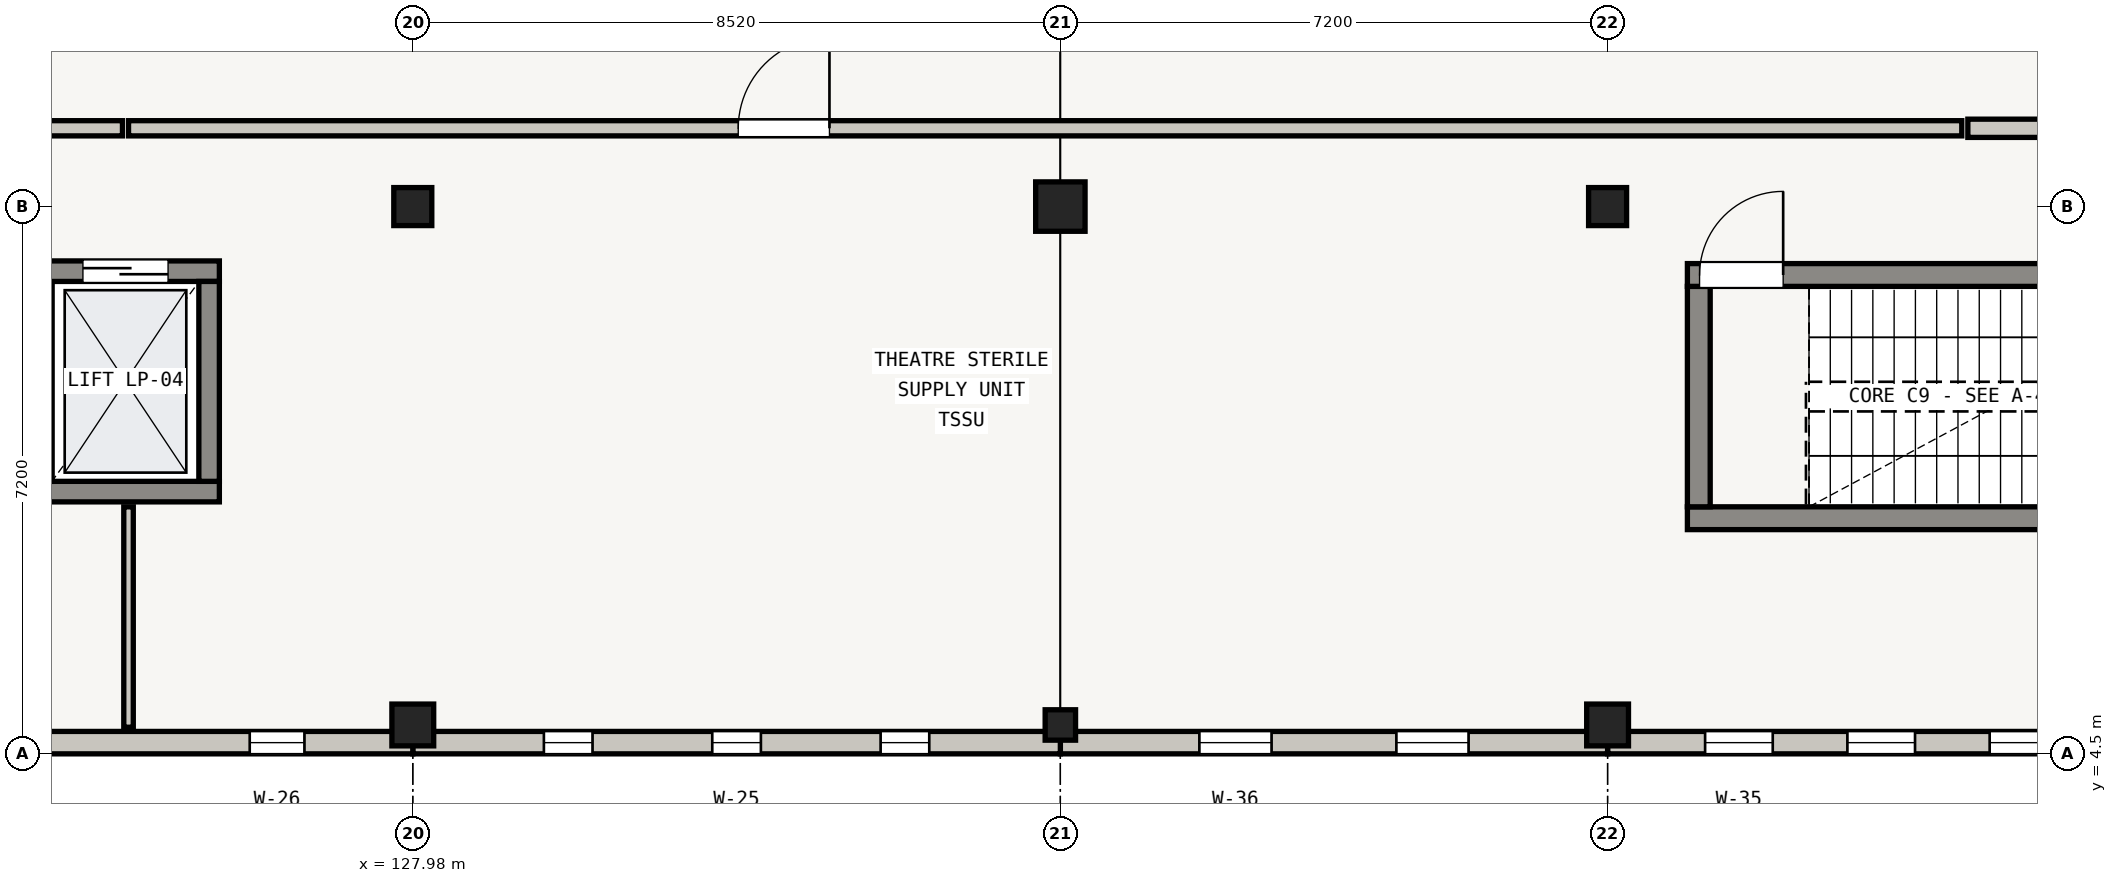
"""IFC4 building model, lengths in metres.
Left out: names, types, materials, properties, quantities, classifications, styles, units other than length and angle.
Written with IfcOpenShell. Run it as: python <this file> out.ifc"""

import sys

from ifc_helpers import new_model, si_unit, direction, frame, frame_2d, origin, origin_2d, place, context, subcontext, project, spatial, rectangle, extrude, element, fill, save


model = new_model("IFC4")
c1 = context("Model", 3, precision=1e-05, world=origin(), true_north=direction((0.0, 1.0)))
c2 = subcontext(c1, "Body", "Model", "MODEL_VIEW")
j1 = project(units=[si_unit("LENGTHUNIT", "METRE"), si_unit("PLANEANGLEUNIT", "RADIAN")], contexts=[c1])
p1 = place(None, origin())
s1 = spatial("IfcSite", under=j1, at=p1, CompositionType="ELEMENT")
p2 = place(p1, origin())
s2 = spatial("IfcBuilding", under=s1, at=p2, CompositionType="ELEMENT")
p3 = place(p2, frame((0.0, 0.0, 4.5)))
s3 = spatial("IfcBuildingStorey", under=s2, at=p3, CompositionType="ELEMENT", Elevation=4.5)
p4 = place(p3, frame((127.98, 4.88, 0.0), z_axis=(0.0, 0.0, 1.0), x_axis=(1.0, 0.0, 0.0)))
e1 = element("IfcColumn", 1, at=p4, inside=s3, PredefinedType="COLUMN", context=c2, shape_type="SweptSolid", body=[
    extrude(rectangle(XDim=0.55, YDim=0.55, at=origin_2d()), origin(), (0.0, 0.0, 1.0), 3.905),
])
p5 = place(p3, frame((127.98, 11.7, 0.0), z_axis=(0.0, 0.0, 1.0), x_axis=(1.0, 0.0, 0.0)))
e2 = element("IfcColumn", 2, at=p5, inside=s3, PredefinedType="COLUMN", context=c2, shape_type="SweptSolid", body=[
    extrude(rectangle(XDim=0.5, YDim=0.5, at=origin_2d()), origin(), (0.0, 0.0, 1.0), 3.905),
])
p6 = place(p3, frame((136.5, 4.88, 0.0), z_axis=(0.0, 0.0, 1.0), x_axis=(1.0, 0.0, 0.0)))
e3 = element("IfcColumn", 3, at=p6, inside=s3, PredefinedType="COLUMN", context=c2, shape_type="SweptSolid", body=[
    extrude(rectangle(XDim=0.4, YDim=0.4, at=origin_2d()), origin(), (0.0, 0.0, 1.0), 3.905),
])
p7 = place(p3, frame((136.5, 11.7, 0.0), z_axis=(0.0, 0.0, 1.0), x_axis=(1.0, 0.0, 0.0)))
e4 = element("IfcColumn", 4, at=p7, inside=s3, PredefinedType="COLUMN", context=c2, shape_type="SweptSolid", body=[
    extrude(rectangle(XDim=0.65, YDim=0.65, at=origin_2d()), origin(), (0.0, 0.0, 1.0), 3.905),
])
p8 = place(p3, frame((143.7, 4.88, 0.0), z_axis=(0.0, 0.0, 1.0), x_axis=(1.0, 0.0, 0.0)))
e5 = element("IfcColumn", 5, at=p8, inside=s3, PredefinedType="COLUMN", context=c2, shape_type="SweptSolid", body=[
    extrude(rectangle(XDim=0.55, YDim=0.55, at=origin_2d()), origin(), (0.0, 0.0, 1.0), 3.905),
])
p9 = place(p3, frame((143.7, 11.7, 0.0), z_axis=(0.0, 0.0, 1.0), x_axis=(1.0, 0.0, 0.0)))
e6 = element("IfcColumn", 6, at=p9, inside=s3, PredefinedType="COLUMN", context=c2, shape_type="SweptSolid", body=[
    extrude(rectangle(XDim=0.5, YDim=0.5, at=origin_2d()), origin(), (0.0, 0.0, 1.0), 3.905),
])
p10 = place(p3, frame((150.9, 4.647, 0.0), z_axis=(0.0, 0.0, 1.0), x_axis=(-1.0, 0.0, 0.0)))
e7 = element("IfcWall", 7, at=p10, inside=s3, PredefinedType="STANDARD", context=c2, shape_type="SweptSolid", body=[
    extrude(rectangle(XDim=7.2, YDim=0.295, at=frame_2d((3.6, 0.0))), origin(), (0.0, 0.0, 1.0), 3.27),
])
p11 = place(p10, frame((1.283, 0.0, 0.55)))
e8 = element("IfcOpeningElement", 8, at=p11, cuts=e7, PredefinedType="OPENING", context=c2, shape_type="SweptSolid", body=[
    extrude(rectangle(XDim=0.89, YDim=2.02, at=frame_2d((0.445, 1.01))), frame((0.0, 0.147, 0.0), z_axis=(0.0, -1.0, 0.0), x_axis=(1.0, 0.0, 0.0)), (0.0, 0.0, 1.0), 0.295),
])
p12 = place(p10, frame((3.155, 0.0, 0.55)))
e9 = element("IfcOpeningElement", 9, at=p12, cuts=e7, PredefinedType="OPENING", context=c2, shape_type="SweptSolid", body=[
    extrude(rectangle(XDim=0.89, YDim=2.02, at=frame_2d((0.445, 1.01))), frame((0.0, 0.147, 0.0), z_axis=(0.0, -1.0, 0.0), x_axis=(1.0, 0.0, 0.0)), (0.0, 0.0, 1.0), 0.295),
])
p13 = place(p10, frame((5.027, 0.0, 0.55)))
e10 = element("IfcOpeningElement", 10, at=p13, cuts=e7, PredefinedType="OPENING", context=c2, shape_type="SweptSolid", body=[
    extrude(rectangle(XDim=0.89, YDim=2.02, at=frame_2d((0.445, 1.01))), frame((0.0, 0.147, 0.0), z_axis=(0.0, -1.0, 0.0), x_axis=(1.0, 0.0, 0.0)), (0.0, 0.0, 1.0), 0.295),
])
p14 = place(p3, frame((143.7, 4.647, 0.0), z_axis=(0.0, 0.0, 1.0), x_axis=(-1.0, 0.0, 0.0)))
e11 = element("IfcWall", 11, at=p14, inside=s3, PredefinedType="STANDARD", context=c2, shape_type="SweptSolid", body=[
    extrude(rectangle(XDim=7.2, YDim=0.295, at=frame_2d((3.6, 0.0))), origin(), (0.0, 0.0, 1.0), 3.29),
])
p15 = place(p14, frame((1.829, 0.0, 0.55)))
e12 = element("IfcOpeningElement", 12, at=p15, cuts=e11, PredefinedType="OPENING", context=c2, shape_type="SweptSolid", body=[
    extrude(rectangle(XDim=0.95, YDim=2.02, at=frame_2d((0.475, 1.01))), frame((0.0, 0.147, 0.0), z_axis=(0.0, -1.0, 0.0), x_axis=(1.0, 0.0, 0.0)), (0.0, 0.0, 1.0), 0.295),
])
p16 = place(p14, frame((4.421, 0.0, 0.55)))
e13 = element("IfcOpeningElement", 13, at=p16, cuts=e11, PredefinedType="OPENING", context=c2, shape_type="SweptSolid", body=[
    extrude(rectangle(XDim=0.95, YDim=2.02, at=frame_2d((0.475, 1.01))), frame((0.0, 0.147, 0.0), z_axis=(0.0, -1.0, 0.0), x_axis=(1.0, 0.0, 0.0)), (0.0, 0.0, 1.0), 0.295),
])
p17 = place(p3, frame((136.5, 4.647, 0.0), z_axis=(0.0, 0.0, 1.0), x_axis=(-1.0, 0.0, 0.0)))
e14 = element("IfcWall", 14, at=p17, inside=s3, PredefinedType="STANDARD", context=c2, shape_type="SweptSolid", body=[
    extrude(rectangle(XDim=8.52, YDim=0.295, at=frame_2d((4.26, 0.0))), origin(), (0.0, 0.0, 1.0), 3.29),
])
p18 = place(p17, frame((1.725, 0.0, 0.55)))
e15 = element("IfcOpeningElement", 15, at=p18, cuts=e14, PredefinedType="OPENING", context=c2, shape_type="SweptSolid", body=[
    extrude(rectangle(XDim=0.64, YDim=1.85, at=frame_2d((0.32, 0.925))), frame((0.0, 0.147, 0.0), z_axis=(0.0, -1.0, 0.0), x_axis=(1.0, 0.0, 0.0)), (0.0, 0.0, 1.0), 0.295),
])
p19 = place(p17, frame((3.94, 0.0, 0.55)))
e16 = element("IfcOpeningElement", 16, at=p19, cuts=e14, PredefinedType="OPENING", context=c2, shape_type="SweptSolid", body=[
    extrude(rectangle(XDim=0.64, YDim=1.85, at=frame_2d((0.32, 0.925))), frame((0.0, 0.147, 0.0), z_axis=(0.0, -1.0, 0.0), x_axis=(1.0, 0.0, 0.0)), (0.0, 0.0, 1.0), 0.295),
])
p20 = place(p17, frame((6.155, 0.0, 0.55)))
e17 = element("IfcOpeningElement", 17, at=p20, cuts=e14, PredefinedType="OPENING", context=c2, shape_type="SweptSolid", body=[
    extrude(rectangle(XDim=0.64, YDim=1.85, at=frame_2d((0.32, 0.925))), frame((0.0, 0.147, 0.0), z_axis=(0.0, -1.0, 0.0), x_axis=(1.0, 0.0, 0.0)), (0.0, 0.0, 1.0), 0.295),
])
p21 = place(p3, frame((127.98, 4.647, 0.0), z_axis=(0.0, 0.0, 1.0), x_axis=(-1.0, 0.0, 0.0)))
e18 = element("IfcWall", 18, at=p21, inside=s3, PredefinedType="STANDARD", context=c2, shape_type="SweptSolid", body=[
    extrude(rectangle(XDim=7.44, YDim=0.295, at=frame_2d((3.72, 0.0))), origin(), (0.0, 0.0, 1.0), 3.27),
])
p22 = place(p21, frame((1.426, 0.0, 0.55)))
e19 = element("IfcOpeningElement", 19, at=p22, cuts=e18, PredefinedType="OPENING", context=c2, shape_type="SweptSolid", body=[
    extrude(rectangle(XDim=0.72, YDim=1.85, at=frame_2d((0.36, 0.925))), frame((0.0, 0.147, 0.0), z_axis=(0.0, -1.0, 0.0), x_axis=(1.0, 0.0, 0.0)), (0.0, 0.0, 1.0), 0.295),
])
p23 = place(p21, frame((5.294, 0.0, 0.55)))
e20 = element("IfcOpeningElement", 20, at=p23, cuts=e18, PredefinedType="OPENING", context=c2, shape_type="SweptSolid", body=[
    extrude(rectangle(XDim=0.72, YDim=1.85, at=frame_2d((0.36, 0.925))), frame((0.0, 0.147, 0.0), z_axis=(0.0, -1.0, 0.0), x_axis=(1.0, 0.0, 0.0)), (0.0, 0.0, 1.0), 0.295),
])
p24 = place(p3, frame((125.435, 7.95, 0.0), z_axis=(0.0, 0.0, 1.0), x_axis=(-1.0, 0.0, 0.0)))
e21 = element("IfcWall", 21, at=p24, inside=s3, PredefinedType="SHEAR", context=c2, shape_type="SweptSolid", body=[
    extrude(rectangle(XDim=2.47, YDim=0.27, at=frame_2d((1.235, 0.0))), origin(), (0.0, 0.0, 1.0), 3.905),
])
p25 = place(p3, frame((122.965, 10.85, 0.0), z_axis=(0.0, 0.0, 1.0), x_axis=(1.0, 0.0, 0.0)))
e22 = element("IfcWall", 22, at=p25, inside=s3, PredefinedType="SHEAR", context=c2, shape_type="SweptSolid", body=[
    extrude(rectangle(XDim=2.47, YDim=0.27, at=frame_2d((1.235, 0.0))), origin(), (0.0, 0.0, 1.0), 3.905),
])
p26 = place(p25, frame((0.675, 0.0, 0.0)))
e23 = element("IfcOpeningElement", 23, at=p26, cuts=e22, PredefinedType="OPENING", context=c2, shape_type="SweptSolid", body=[
    extrude(rectangle(XDim=1.12, YDim=2.1, at=frame_2d((0.56, 1.05))), frame((0.0, 0.135, 0.0), z_axis=(0.0, -1.0, 0.0), x_axis=(1.0, 0.0, 0.0)), (0.0, 0.0, 1.0), 0.27),
])
p27 = place(p3, frame((125.3, 10.715, 0.0), z_axis=(0.0, 0.0, 1.0), x_axis=(0.0, -1.0, 0.0)))
e24 = element("IfcWall", 24, at=p27, inside=s3, PredefinedType="SHEAR", context=c2, shape_type="SweptSolid", body=[
    extrude(rectangle(XDim=2.63, YDim=0.27, at=frame_2d((1.315, 0.0))), origin(), (0.0, 0.0, 1.0), 3.905),
])
p28 = place(p3, frame((152.05, 7.6, 0.0), z_axis=(0.0, 0.0, 1.0), x_axis=(-1.0, 0.0, 0.0)))
e25 = element("IfcWall", 25, at=p28, inside=s3, PredefinedType="SHEAR", context=c2, shape_type="SweptSolid", body=[
    extrude(rectangle(XDim=7.3, YDim=0.3, at=frame_2d((3.65, 0.0))), origin(), (0.0, 0.0, 1.0), 3.905),
])
p29 = place(p3, frame((144.9, 7.75, 0.0), z_axis=(0.0, 0.0, 1.0), x_axis=(0.0, 1.0, 0.0)))
e26 = element("IfcWall", 26, at=p29, inside=s3, PredefinedType="SHEAR", context=c2, shape_type="SweptSolid", body=[
    extrude(rectangle(XDim=2.9, YDim=0.3, at=frame_2d((1.45, 0.0))), origin(), (0.0, 0.0, 1.0), 3.905),
])
p30 = place(p3, frame((144.75, 10.8, 0.0), z_axis=(0.0, 0.0, 1.0), x_axis=(1.0, 0.0, 0.0)))
e27 = element("IfcWall", 27, at=p30, inside=s3, PredefinedType="SHEAR", context=c2, shape_type="SweptSolid", body=[
    extrude(rectangle(XDim=7.3, YDim=0.3, at=frame_2d((3.65, 0.0))), origin(), (0.0, 0.0, 1.0), 3.905),
])
p31 = place(p30, frame((0.16, 0.0, 0.0)))
e28 = element("IfcOpeningElement", 28, at=p31, cuts=e27, PredefinedType="OPENING", context=c2, shape_type="SweptSolid", body=[
    extrude(rectangle(XDim=1.1, YDim=2.05, at=frame_2d((0.55, 1.025))), frame((0.0, 0.15, 0.0), z_axis=(0.0, -1.0, 0.0), x_axis=(1.0, 0.0, 0.0)), (0.0, 0.0, 1.0), 0.3),
])
p32 = place(p3, frame((124.24, 12.73, 0.0), z_axis=(0.0, 0.0, 1.0), x_axis=(1.0, 0.0, 0.0)))
e29 = element("IfcWall", 29, at=p32, inside=s3, PredefinedType="SOLIDWALL", context=c2, shape_type="SweptSolid", body=[
    extrude(rectangle(XDim=24.12, YDim=0.2, at=frame_2d((12.06, 0.0))), origin(), (0.0, 0.0, 1.0), 2.925),
])
p33 = place(p32, frame((8.022, 0.0, 0.0)))
e30 = element("IfcOpeningElement", 30, at=p33, cuts=e29, PredefinedType="OPENING", context=c2, shape_type="SweptSolid", body=[
    extrude(rectangle(XDim=1.2, YDim=2.05, at=frame_2d((0.6, 1.025))), frame((0.0, 0.1, 0.0), z_axis=(0.0, -1.0, 0.0), x_axis=(1.0, 0.0, 0.0)), (0.0, 0.0, 1.0), 0.2),
])
p34 = place(p3, frame((124.24, 4.85, 0.0), z_axis=(0.0, 0.0, 1.0), x_axis=(0.0, 1.0, 0.0)))
e31 = element("IfcWall", 31, at=p34, inside=s3, PredefinedType="PARTITIONING", context=c2, shape_type="SweptSolid", body=[
    extrude(rectangle(XDim=2.9, YDim=0.125, at=frame_2d((1.45, 0.0))), origin(), (0.0, 0.0, 1.0), 2.925),
])
p35 = place(p3, frame((148.44, 12.73, 0.0), z_axis=(0.0, 0.0, 1.0), x_axis=(1.0, 0.0, 0.0)))
e32 = element("IfcWall", 32, at=p35, inside=s3, PredefinedType="SOLIDWALL", context=c2, shape_type="SweptSolid", body=[
    extrude(rectangle(XDim=16.51, YDim=0.24, at=frame_2d((8.255, 0.0))), origin(), (0.0, 0.0, 1.0), 2.925),
])
p36 = place(p35, frame((7.58, 0.0, 0.0)))
e33 = element("IfcOpeningElement", 33, at=p36, cuts=e32, PredefinedType="OPENING", context=c2, shape_type="SweptSolid", body=[
    extrude(rectangle(XDim=1.35, YDim=2.1, at=frame_2d((0.675, 1.05))), frame((0.0, 0.12, 0.0), z_axis=(0.0, -1.0, 0.0), x_axis=(1.0, 0.0, 0.0)), (0.0, 0.0, 1.0), 0.24),
])
p37 = place(p3, frame((117.84, 12.73, 0.0), z_axis=(0.0, 0.0, 1.0), x_axis=(1.0, 0.0, 0.0)))
e34 = element("IfcWall", 34, at=p37, inside=s3, PredefinedType="SOLIDWALL", context=c2, shape_type="SweptSolid", body=[
    extrude(rectangle(XDim=6.32, YDim=0.2, at=frame_2d((3.16, 0.0))), origin(), (0.0, 0.0, 1.0), 2.925),
])
p38 = place(p37, frame((3.84, 0.0, 0.0)))
e35 = element("IfcOpeningElement", 35, at=p38, cuts=e34, PredefinedType="OPENING", context=c2, shape_type="SweptSolid", body=[
    extrude(rectangle(XDim=1.2, YDim=2.05, at=frame_2d((0.6, 1.025))), frame((0.0, 0.1, 0.0), z_axis=(0.0, -1.0, 0.0), x_axis=(1.0, 0.0, 0.0)), (0.0, 0.0, 1.0), 0.2),
])
p39 = place(p11, origin())
e36 = element("IfcWindow", 36, at=p39, inside=s3, PartitioningType="DOUBLE_PANEL_VERTICAL", PredefinedType="WINDOW", context=c2, shape_type="SweptSolid", body=[
    extrude(rectangle(XDim=0.89, YDim=2.02, at=frame_2d((0.445, 1.01))), frame((0.0, 0.03, 0.0), z_axis=(0.0, -1.0, 0.0), x_axis=(1.0, 0.0, 0.0)), (0.0, 0.0, 1.0), 0.06),
])
fill(e8, e36)
p40 = place(p12, origin())
e37 = element("IfcWindow", 37, at=p40, inside=s3, PartitioningType="DOUBLE_PANEL_VERTICAL", PredefinedType="WINDOW", context=c2, shape_type="SweptSolid", body=[
    extrude(rectangle(XDim=0.89, YDim=2.02, at=frame_2d((0.445, 1.01))), frame((0.0, 0.03, 0.0), z_axis=(0.0, -1.0, 0.0), x_axis=(1.0, 0.0, 0.0)), (0.0, 0.0, 1.0), 0.06),
])
fill(e9, e37)
p41 = place(p13, origin())
e38 = element("IfcWindow", 38, at=p41, inside=s3, PartitioningType="DOUBLE_PANEL_VERTICAL", PredefinedType="WINDOW", context=c2, shape_type="SweptSolid", body=[
    extrude(rectangle(XDim=0.89, YDim=2.02, at=frame_2d((0.445, 1.01))), frame((0.0, 0.03, 0.0), z_axis=(0.0, -1.0, 0.0), x_axis=(1.0, 0.0, 0.0)), (0.0, 0.0, 1.0), 0.06),
])
fill(e10, e38)
p42 = place(p15, origin())
e39 = element("IfcWindow", 39, at=p42, inside=s3, PartitioningType="DOUBLE_PANEL_VERTICAL", PredefinedType="WINDOW", context=c2, shape_type="SweptSolid", body=[
    extrude(rectangle(XDim=0.95, YDim=2.02, at=frame_2d((0.475, 1.01))), frame((0.0, 0.03, 0.0), z_axis=(0.0, -1.0, 0.0), x_axis=(1.0, 0.0, 0.0)), (0.0, 0.0, 1.0), 0.06),
])
fill(e12, e39)
p43 = place(p16, origin())
e40 = element("IfcWindow", 40, at=p43, inside=s3, PartitioningType="DOUBLE_PANEL_VERTICAL", PredefinedType="WINDOW", context=c2, shape_type="SweptSolid", body=[
    extrude(rectangle(XDim=0.95, YDim=2.02, at=frame_2d((0.475, 1.01))), frame((0.0, 0.03, 0.0), z_axis=(0.0, -1.0, 0.0), x_axis=(1.0, 0.0, 0.0)), (0.0, 0.0, 1.0), 0.06),
])
fill(e13, e40)
p44 = place(p18, origin())
e41 = element("IfcWindow", 41, at=p44, inside=s3, PartitioningType="SINGLE_PANEL", PredefinedType="WINDOW", context=c2, shape_type="SweptSolid", body=[
    extrude(rectangle(XDim=0.64, YDim=1.85, at=frame_2d((0.32, 0.925))), frame((0.0, 0.03, 0.0), z_axis=(0.0, -1.0, 0.0), x_axis=(1.0, 0.0, 0.0)), (0.0, 0.0, 1.0), 0.06),
])
fill(e15, e41)
p45 = place(p19, origin())
e42 = element("IfcWindow", 42, at=p45, inside=s3, PartitioningType="SINGLE_PANEL", PredefinedType="WINDOW", context=c2, shape_type="SweptSolid", body=[
    extrude(rectangle(XDim=0.64, YDim=1.85, at=frame_2d((0.32, 0.925))), frame((0.0, 0.03, 0.0), z_axis=(0.0, -1.0, 0.0), x_axis=(1.0, 0.0, 0.0)), (0.0, 0.0, 1.0), 0.06),
])
fill(e16, e42)
p46 = place(p20, origin())
e43 = element("IfcWindow", 43, at=p46, inside=s3, PartitioningType="SINGLE_PANEL", PredefinedType="WINDOW", context=c2, shape_type="SweptSolid", body=[
    extrude(rectangle(XDim=0.64, YDim=1.85, at=frame_2d((0.32, 0.925))), frame((0.0, 0.03, 0.0), z_axis=(0.0, -1.0, 0.0), x_axis=(1.0, 0.0, 0.0)), (0.0, 0.0, 1.0), 0.06),
])
fill(e17, e43)
p47 = place(p22, origin())
e44 = element("IfcWindow", 44, at=p47, inside=s3, PartitioningType="SINGLE_PANEL", PredefinedType="WINDOW", context=c2, shape_type="SweptSolid", body=[
    extrude(rectangle(XDim=0.72, YDim=1.85, at=frame_2d((0.36, 0.925))), frame((0.0, 0.03, 0.0), z_axis=(0.0, -1.0, 0.0), x_axis=(1.0, 0.0, 0.0)), (0.0, 0.0, 1.0), 0.06),
])
fill(e19, e44)
p48 = place(p26, origin())
e45 = element("IfcDoor", 45, at=p48, inside=s3, OperationType="DOUBLE_DOOR_SLIDING", PredefinedType="DOOR", context=c2, shape_type="SweptSolid", body=[
    extrude(rectangle(XDim=1.12, YDim=2.1, at=frame_2d((0.56, 1.05))), frame((0.0, 0.025, 0.0), z_axis=(0.0, -1.0, 0.0), x_axis=(1.0, 0.0, 0.0)), (0.0, 0.0, 1.0), 0.05),
])
fill(e23, e45)
p49 = place(p31, origin())
e46 = element("IfcDoor", 46, at=p49, inside=s3, OperationType="SINGLE_SWING_RIGHT", PredefinedType="DOOR", context=c2, shape_type="SweptSolid", body=[
    extrude(rectangle(XDim=1.1, YDim=2.05, at=frame_2d((0.55, 1.025))), frame((0.0, 0.025, 0.0), z_axis=(0.0, -1.0, 0.0), x_axis=(1.0, 0.0, 0.0)), (0.0, 0.0, 1.0), 0.05),
])
fill(e28, e46)
p50 = place(p33, origin())
e47 = element("IfcDoor", 47, at=p50, inside=s3, OperationType="SINGLE_SWING_RIGHT", PredefinedType="DOOR", context=c2, shape_type="SweptSolid", body=[
    extrude(rectangle(XDim=1.2, YDim=2.05, at=frame_2d((0.6, 1.025))), frame((0.0, 0.025, 0.0), z_axis=(0.0, -1.0, 0.0), x_axis=(1.0, 0.0, 0.0)), (0.0, 0.0, 1.0), 0.05),
])
fill(e30, e47)
save(model, sys.argv[1])
